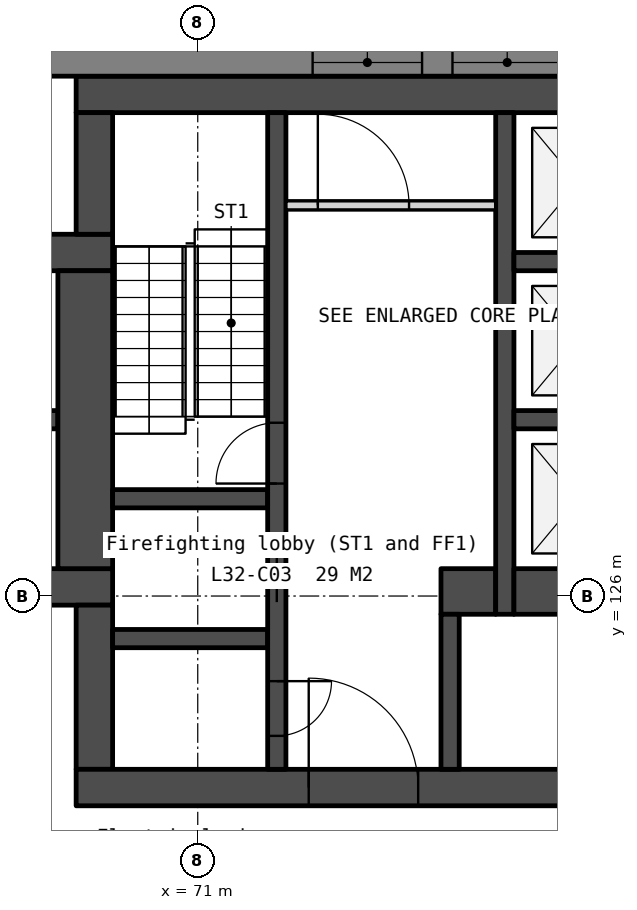
"""IFC4 building model, lengths in metres.
Left out: names, types, materials, properties, quantities, classifications, styles, units other than length and angle.
Written with IfcOpenShell. Run it as: python <this file> out.ifc"""

import sys

from ifc_helpers import new_model, si_unit, direction, frame, frame_2d, origin, place, context, subcontext, project, spatial, polyline, rectangle, outline, extrude, element, fill, save


model = new_model("IFC4")
c1 = context("Model", 3, precision=1e-05, world=origin(), true_north=direction((0.0, 1.0)))
c2 = subcontext(c1, "Body", "Model", "MODEL_VIEW")
j1 = project(units=[si_unit("LENGTHUNIT", "METRE"), si_unit("PLANEANGLEUNIT", "RADIAN")], contexts=[c1])
p1 = place(None, origin())
s1 = spatial("IfcSite", under=j1, at=p1, CompositionType="ELEMENT")
p2 = place(p1, origin())
s2 = spatial("IfcBuilding", under=s1, at=p2, CompositionType="ELEMENT")
p3 = place(p2, frame((0.0, 0.0, 128.6)))
s3 = spatial("IfcBuildingStorey", under=s2, at=p3, CompositionType="ELEMENT", Elevation=128.6)
for number, where, z_axis, x_axis in (
    (1, (66.0, 131.65, 0.0), (0.0, 0.0, 1.0), (1.0, 0.0, 0.0)),
    (2, (66.0, 126.15, 0.0), (0.0, 0.0, 1.0), (1.0, 0.0, 0.0)),
):
    element("IfcWall", number, at=place(p3, frame(where, z_axis=z_axis, x_axis=x_axis)), inside=s3, PredefinedType="SOLIDWALL", context=c2, shape_type="SweptSolid", body=[
        extrude(rectangle(XDim=3.6, YDim=0.6, at=frame_2d((1.8, 0.0))), origin(), (0.0, 0.0, 1.0), 3.75),
    ])
p4 = place(p3, frame((66.6, 128.9, 0.0), z_axis=(0.0, 0.0, 1.0), x_axis=(1.0, 0.0, 0.0)))
e3 = element("IfcWall", 3, at=p4, inside=s3, PredefinedType="SOLIDWALL", context=c2, shape_type="SweptSolid", body=[
    extrude(rectangle(XDim=2.1, YDim=0.3, at=frame_2d((1.05, 0.0))), origin(), (0.0, 0.0, 1.0), 3.75),
])
p5 = place(p3, frame((69.15, 131.35, 0.0), z_axis=(0.0, 0.0, 1.0), x_axis=(0.0, -1.0, 0.0)))
e4 = element("IfcWall", 4, at=p5, inside=s3, PredefinedType="SOLIDWALL", context=c2, shape_type="SweptSolid", body=[
    extrude(rectangle(XDim=4.9, YDim=0.9, at=frame_2d((2.45, 0.0))), origin(), (0.0, 0.0, 1.0), 3.75),
])
p6 = place(p3, frame((69.0, 134.25, 0.0), z_axis=(0.0, 0.0, 1.0), x_axis=(1.0, 0.0, 0.0)))
e5 = element("IfcWall", 5, at=p6, inside=s3, PredefinedType="SOLIDWALL", context=c2, shape_type="SweptSolid", body=[
    extrude(rectangle(XDim=22.0, YDim=0.6, at=frame_2d((11.0, 0.0))), origin(), (0.0, 0.0, 1.0), 3.75),
])
p7 = place(p3, frame((69.3, 133.95, 0.0), z_axis=(0.0, 0.0, 1.0), x_axis=(0.0, -1.0, 0.0)))
e6 = element("IfcWall", 6, at=p7, inside=s3, PredefinedType="SOLIDWALL", context=c2, shape_type="SweptSolid", body=[
    extrude(rectangle(XDim=2.0, YDim=0.6, at=frame_2d((1.0, 0.0))), origin(), (0.0, 0.0, 1.0), 3.75),
])
p8 = place(p3, frame((69.3, 125.85, 0.0), z_axis=(0.0, 0.0, 1.0), x_axis=(0.0, -1.0, 0.0)))
e7 = element("IfcWall", 7, at=p8, inside=s3, PredefinedType="SOLIDWALL", context=c2, shape_type="SweptSolid", body=[
    extrude(rectangle(XDim=2.7, YDim=0.6, at=frame_2d((1.35, 0.0))), origin(), (0.0, 0.0, 1.0), 3.75),
])
p9 = place(p3, frame((69.0, 122.85, 0.0), z_axis=(0.0, 0.0, 1.0), x_axis=(1.0, 0.0, 0.0)))
e8 = element("IfcWall", 8, at=p9, inside=s3, PredefinedType="SOLIDWALL", context=c2, shape_type="SweptSolid", body=[
    extrude(rectangle(XDim=22.0, YDim=0.6, at=frame_2d((11.0, 0.0))), origin(), (0.0, 0.0, 1.0), 3.75),
])
p10 = place(p9, frame((16.375, 0.0, 0.0)))
e9 = element("IfcOpeningElement", 9, at=p10, cuts=e8, PredefinedType="OPENING", context=c2, shape_type="SweptSolid", body=[
    extrude(rectangle(XDim=1.8, YDim=2.1, at=frame_2d((0.9, 1.05))), frame((0.0, 0.31, 0.0), z_axis=(0.0, -1.0, 0.0), x_axis=(1.0, 0.0, 0.0)), (0.0, 0.0, 1.0), 0.62),
])
p11 = place(p9, frame((3.825, 0.0, 0.0)))
e10 = element("IfcOpeningElement", 10, at=p11, cuts=e8, PredefinedType="OPENING", context=c2, shape_type="SweptSolid", body=[
    extrude(rectangle(XDim=1.8, YDim=2.1, at=frame_2d((0.9, 1.05))), frame((0.0, 0.31, 0.0), z_axis=(0.0, -1.0, 0.0), x_axis=(1.0, 0.0, 0.0)), (0.0, 0.0, 1.0), 0.62),
])
p12 = place(p9, frame((12.85, 0.0, 0.0)))
e11 = element("IfcOpeningElement", 11, at=p12, cuts=e8, PredefinedType="OPENING", context=c2, shape_type="SweptSolid", body=[
    extrude(rectangle(XDim=1.5, YDim=2.1, at=frame_2d((0.75, 1.05))), frame((0.0, 0.31, 0.0), z_axis=(0.0, -1.0, 0.0), x_axis=(1.0, 0.0, 0.0)), (0.0, 0.0, 1.0), 0.62),
])
for number, where, z_axis, x_axis in (
    (12, (69.6, 127.6, 0.0), (0.0, 0.0, 1.0), (1.0, 0.0, 0.0)),
    (13, (69.6, 125.3, 0.0), (0.0, 0.0, 1.0), (1.0, 0.0, 0.0)),
):
    element("IfcWall", number, at=place(p3, frame(where, z_axis=z_axis, x_axis=x_axis)), inside=s3, PredefinedType="SOLIDWALL", context=c2, shape_type="SweptSolid", body=[
        extrude(rectangle(XDim=2.55, YDim=0.3, at=frame_2d((1.275, 0.0))), origin(), (0.0, 0.0, 1.0), 3.75),
    ])
p13 = place(p3, frame((72.3, 133.95, 0.0), z_axis=(0.0, 0.0, 1.0), x_axis=(0.0, -1.0, 0.0)))
e14 = element("IfcWall", 14, at=p13, inside=s3, PredefinedType="SOLIDWALL", context=c2, shape_type="SweptSolid", body=[
    extrude(rectangle(XDim=10.8, YDim=0.3, at=frame_2d((5.4, 0.0))), origin(), (0.0, 0.0, 1.0), 3.75),
])
p14 = place(p13, frame((6.95, 0.0, 0.0)))
e15 = element("IfcOpeningElement", 15, at=p14, cuts=e14, PredefinedType="OPENING", context=c2, shape_type="SweptSolid", body=[
    extrude(rectangle(XDim=1.1, YDim=2.1, at=frame_2d((0.55, 1.05))), frame((0.0, 0.16, 0.0), z_axis=(0.0, -1.0, 0.0), x_axis=(1.0, 0.0, 0.0)), (0.0, 0.0, 1.0), 0.32),
])
p15 = place(p13, frame((9.35, 0.0, 0.0)))
e16 = element("IfcOpeningElement", 16, at=p15, cuts=e14, PredefinedType="OPENING", context=c2, shape_type="SweptSolid", body=[
    extrude(rectangle(XDim=0.9, YDim=2.1, at=frame_2d((0.45, 1.05))), frame((0.0, 0.16, 0.0), z_axis=(0.0, -1.0, 0.0), x_axis=(1.0, 0.0, 0.0)), (0.0, 0.0, 1.0), 0.32),
])
p16 = place(p13, frame((5.1, 0.0, 0.0)))
e17 = element("IfcOpeningElement", 17, at=p16, cuts=e14, PredefinedType="OPENING", context=c2, shape_type="SweptSolid", body=[
    extrude(rectangle(XDim=1.0, YDim=2.1, at=frame_2d((0.5, 1.05))), frame((0.0, 0.16, 0.0), z_axis=(0.0, -1.0, 0.0), x_axis=(1.0, 0.0, 0.0)), (0.0, 0.0, 1.0), 0.32),
])
p17 = place(p3, frame((72.45, 132.425, 0.0), z_axis=(0.0, 0.0, 1.0), x_axis=(1.0, 0.0, 0.0)))
e18 = element("IfcWall", 18, at=p17, inside=s3, PredefinedType="PARTITIONING", context=c2, shape_type="SweptSolid", body=[
    extrude(rectangle(XDim=3.45, YDim=0.15, at=frame_2d((1.725, 0.0))), origin(), (0.0, 0.0, 1.0), 3.75),
])
p18 = place(p17, frame((0.525, 0.0, 0.0)))
e19 = element("IfcOpeningElement", 19, at=p18, cuts=e18, PredefinedType="OPENING", context=c2, shape_type="SweptSolid", body=[
    extrude(rectangle(XDim=1.5, YDim=2.1, at=frame_2d((0.75, 1.05))), frame((0.0, 0.085, 0.0), z_axis=(0.0, -1.0, 0.0), x_axis=(1.0, 0.0, 0.0)), (0.0, 0.0, 1.0), 0.17),
])
p19 = place(p3, frame((75.0, 126.075, 0.0), z_axis=(0.0, 0.0, 1.0), x_axis=(1.0, 0.0, 0.0)))
e20 = element("IfcWall", 20, at=p19, inside=s3, PredefinedType="SOLIDWALL", context=c2, shape_type="SweptSolid", body=[
    extrude(rectangle(XDim=0.9, YDim=0.75, at=frame_2d((0.45, 0.0))), origin(), (0.0, 0.0, 1.0), 3.75),
])
p20 = place(p3, frame((75.15, 125.7, 0.0), z_axis=(0.0, 0.0, 1.0), x_axis=(0.0, -1.0, 0.0)))
e21 = element("IfcWall", 21, at=p20, inside=s3, PredefinedType="SOLIDWALL", context=c2, shape_type="SweptSolid", body=[
    extrude(rectangle(XDim=2.55, YDim=0.3, at=frame_2d((1.275, 0.0))), origin(), (0.0, 0.0, 1.0), 3.75),
])
p21 = place(p3, frame((76.05, 133.95, 0.0), z_axis=(0.0, 0.0, 1.0), x_axis=(0.0, -1.0, 0.0)))
e22 = element("IfcWall", 22, at=p21, inside=s3, PredefinedType="SOLIDWALL", context=c2, shape_type="SweptSolid", body=[
    extrude(rectangle(XDim=8.25, YDim=0.3, at=frame_2d((4.125, 0.0))), origin(), (0.0, 0.0, 1.0), 3.75),
])
for number, where, z_axis, x_axis in (
    (23, (76.2, 131.5, 0.0), (0.0, 0.0, 1.0), (1.0, 0.0, 0.0)),
    (24, (76.2, 128.9, 0.0), (0.0, 0.0, 1.0), (1.0, 0.0, 0.0)),
):
    element("IfcWall", number, at=place(p3, frame(where, z_axis=z_axis, x_axis=x_axis)), inside=s3, PredefinedType="SOLIDWALL", context=c2, shape_type="SweptSolid", body=[
        extrude(rectangle(XDim=2.1, YDim=0.3, at=frame_2d((1.05, 0.0))), origin(), (0.0, 0.0, 1.0), 3.75),
    ])
p22 = place(p3, frame((76.2, 126.075, 0.0), z_axis=(0.0, 0.0, 1.0), x_axis=(1.0, 0.0, 0.0)))
e25 = element("IfcWall", 25, at=p22, inside=s3, PredefinedType="SOLIDWALL", context=c2, shape_type="SweptSolid", body=[
    extrude(rectangle(XDim=2.1, YDim=0.75, at=frame_2d((1.05, 0.0))), origin(), (0.0, 0.0, 1.0), 3.75),
])
p23 = place(p3, frame((100.243, 134.775, -0.45), z_axis=(0.0, 0.0, 1.0), x_axis=(-1.0, 0.0, 0.0)))
e26 = element("IfcWall", 26, at=p23, inside=s3, PredefinedType="SOLIDWALL", context=c2, shape_type="SweptSolid", body=[
    extrude(outline(polyline([(40.486, 0.0), (40.486, 4.2), (0.0, 4.2), (0.0, 0.0), (40.486, 0.0)])), frame((0.0, 0.225, 0.0), z_axis=(0.0, -1.0, 0.0), x_axis=(1.0, 0.0, 0.0)), (0.0, 0.0, 1.0), 0.45),
])
p24 = place(p23, frame((3.011, 0.0, 1.25)))
e27 = element("IfcOpeningElement", 27, at=p24, cuts=e26, PredefinedType="OPENING", context=c2, shape_type="SweptSolid", body=[
    extrude(rectangle(XDim=1.8, YDim=2.2, at=frame_2d((0.9, 1.1))), frame((0.0, 0.235, 0.0), z_axis=(0.0, -1.0, 0.0), x_axis=(1.0, 0.0, 0.0)), (0.0, 0.0, 1.0), 0.47),
])
p25 = place(p23, frame((5.311, 0.0, 1.25)))
e28 = element("IfcOpeningElement", 28, at=p25, cuts=e26, PredefinedType="OPENING", context=c2, shape_type="SweptSolid", body=[
    extrude(rectangle(XDim=1.8, YDim=2.2, at=frame_2d((0.9, 1.1))), frame((0.0, 0.235, 0.0), z_axis=(0.0, -1.0, 0.0), x_axis=(1.0, 0.0, 0.0)), (0.0, 0.0, 1.0), 0.47),
])
p26 = place(p23, frame((13.132, 0.0, 1.25)))
e29 = element("IfcOpeningElement", 29, at=p26, cuts=e26, PredefinedType="OPENING", context=c2, shape_type="SweptSolid", body=[
    extrude(rectangle(XDim=1.8, YDim=2.2, at=frame_2d((0.9, 1.1))), frame((0.0, 0.235, 0.0), z_axis=(0.0, -1.0, 0.0), x_axis=(1.0, 0.0, 0.0)), (0.0, 0.0, 1.0), 0.47),
])
p27 = place(p23, frame((15.432, 0.0, 1.25)))
e30 = element("IfcOpeningElement", 30, at=p27, cuts=e26, PredefinedType="OPENING", context=c2, shape_type="SweptSolid", body=[
    extrude(rectangle(XDim=1.8, YDim=2.2, at=frame_2d((0.9, 1.1))), frame((0.0, 0.235, 0.0), z_axis=(0.0, -1.0, 0.0), x_axis=(1.0, 0.0, 0.0)), (0.0, 0.0, 1.0), 0.47),
])
p28 = place(p23, frame((23.254, 0.0, 1.25)))
e31 = element("IfcOpeningElement", 31, at=p28, cuts=e26, PredefinedType="OPENING", context=c2, shape_type="SweptSolid", body=[
    extrude(rectangle(XDim=1.8, YDim=2.2, at=frame_2d((0.9, 1.1))), frame((0.0, 0.235, 0.0), z_axis=(0.0, -1.0, 0.0), x_axis=(1.0, 0.0, 0.0)), (0.0, 0.0, 1.0), 0.47),
])
p29 = place(p23, frame((25.554, 0.0, 1.25)))
e32 = element("IfcOpeningElement", 32, at=p29, cuts=e26, PredefinedType="OPENING", context=c2, shape_type="SweptSolid", body=[
    extrude(rectangle(XDim=1.8, YDim=2.2, at=frame_2d((0.9, 1.1))), frame((0.0, 0.235, 0.0), z_axis=(0.0, -1.0, 0.0), x_axis=(1.0, 0.0, 0.0)), (0.0, 0.0, 1.0), 0.47),
])
p30 = place(p23, frame((33.375, 0.0, 1.25)))
e33 = element("IfcOpeningElement", 33, at=p30, cuts=e26, PredefinedType="OPENING", context=c2, shape_type="SweptSolid", body=[
    extrude(rectangle(XDim=1.8, YDim=2.2, at=frame_2d((0.9, 1.1))), frame((0.0, 0.235, 0.0), z_axis=(0.0, -1.0, 0.0), x_axis=(1.0, 0.0, 0.0)), (0.0, 0.0, 1.0), 0.47),
])
p31 = place(p23, frame((35.675, 0.0, 1.25)))
e34 = element("IfcOpeningElement", 34, at=p31, cuts=e26, PredefinedType="OPENING", context=c2, shape_type="SweptSolid", body=[
    extrude(rectangle(XDim=1.8, YDim=2.2, at=frame_2d((0.9, 1.1))), frame((0.0, 0.235, 0.0), z_axis=(0.0, -1.0, 0.0), x_axis=(1.0, 0.0, 0.0)), (0.0, 0.0, 1.0), 0.47),
])
p32 = place(p3, frame((57.652, 131.129, -0.45), z_axis=(0.0, 0.0, 1.0), x_axis=(0.499997369791, -0.866026922331, 0.0)))
e35 = element("IfcWall", 35, at=p32, inside=s3, PredefinedType="SOLIDWALL", context=c2, shape_type="SweptSolid", body=[
    extrude(outline(polyline([(40.486, 0.0), (40.486, 4.2), (0.0, 4.2), (0.0, 0.0), (40.486, 0.0)])), frame((0.0, 0.225, 0.0), z_axis=(0.0, -1.0, 0.0), x_axis=(1.0, 0.0, 0.0)), (0.0, 0.0, 1.0), 0.45),
])
p33 = place(p32, frame((3.011, 0.0, 1.25)))
e36 = element("IfcOpeningElement", 36, at=p33, cuts=e35, PredefinedType="OPENING", context=c2, shape_type="SweptSolid", body=[
    extrude(rectangle(XDim=1.8, YDim=2.2, at=frame_2d((0.9, 1.1))), frame((0.0, 0.235, 0.0), z_axis=(0.0, -1.0, 0.0), x_axis=(1.0, 0.0, 0.0)), (0.0, 0.0, 1.0), 0.47),
])
p34 = place(p32, frame((5.311, 0.0, 1.25)))
e37 = element("IfcOpeningElement", 37, at=p34, cuts=e35, PredefinedType="OPENING", context=c2, shape_type="SweptSolid", body=[
    extrude(rectangle(XDim=1.8, YDim=2.2, at=frame_2d((0.9, 1.1))), frame((0.0, 0.235, 0.0), z_axis=(0.0, -1.0, 0.0), x_axis=(1.0, 0.0, 0.0)), (0.0, 0.0, 1.0), 0.47),
])
p35 = place(p32, frame((13.132, 0.0, 1.25)))
e38 = element("IfcOpeningElement", 38, at=p35, cuts=e35, PredefinedType="OPENING", context=c2, shape_type="SweptSolid", body=[
    extrude(rectangle(XDim=1.8, YDim=2.2, at=frame_2d((0.9, 1.1))), frame((0.0, 0.235, 0.0), z_axis=(0.0, -1.0, 0.0), x_axis=(1.0, 0.0, 0.0)), (0.0, 0.0, 1.0), 0.47),
])
p36 = place(p32, frame((15.432, 0.0, 1.25)))
e39 = element("IfcOpeningElement", 39, at=p36, cuts=e35, PredefinedType="OPENING", context=c2, shape_type="SweptSolid", body=[
    extrude(rectangle(XDim=1.8, YDim=2.2, at=frame_2d((0.9, 1.1))), frame((0.0, 0.235, 0.0), z_axis=(0.0, -1.0, 0.0), x_axis=(1.0, 0.0, 0.0)), (0.0, 0.0, 1.0), 0.47),
])
p37 = place(p32, frame((23.254, 0.0, 1.25)))
e40 = element("IfcOpeningElement", 40, at=p37, cuts=e35, PredefinedType="OPENING", context=c2, shape_type="SweptSolid", body=[
    extrude(rectangle(XDim=1.8, YDim=2.2, at=frame_2d((0.9, 1.1))), frame((0.0, 0.235, 0.0), z_axis=(0.0, -1.0, 0.0), x_axis=(1.0, 0.0, 0.0)), (0.0, 0.0, 1.0), 0.47),
])
p38 = place(p32, frame((25.554, 0.0, 1.25)))
e41 = element("IfcOpeningElement", 41, at=p38, cuts=e35, PredefinedType="OPENING", context=c2, shape_type="SweptSolid", body=[
    extrude(rectangle(XDim=1.8, YDim=2.2, at=frame_2d((0.9, 1.1))), frame((0.0, 0.235, 0.0), z_axis=(0.0, -1.0, 0.0), x_axis=(1.0, 0.0, 0.0)), (0.0, 0.0, 1.0), 0.47),
])
p39 = place(p32, frame((33.375, 0.0, 1.25)))
e42 = element("IfcOpeningElement", 42, at=p39, cuts=e35, PredefinedType="OPENING", context=c2, shape_type="SweptSolid", body=[
    extrude(rectangle(XDim=1.8, YDim=2.2, at=frame_2d((0.9, 1.1))), frame((0.0, 0.235, 0.0), z_axis=(0.0, -1.0, 0.0), x_axis=(1.0, 0.0, 0.0)), (0.0, 0.0, 1.0), 0.47),
])
p40 = place(p32, frame((35.675, 0.0, 1.25)))
e43 = element("IfcOpeningElement", 43, at=p40, cuts=e35, PredefinedType="OPENING", context=c2, shape_type="SweptSolid", body=[
    extrude(rectangle(XDim=1.8, YDim=2.2, at=frame_2d((0.9, 1.1))), frame((0.0, 0.235, 0.0), z_axis=(0.0, -1.0, 0.0), x_axis=(1.0, 0.0, 0.0)), (0.0, 0.0, 1.0), 0.47),
])
p41 = place(p14, origin())
e44 = element("IfcDoor", 44, at=p41, inside=s3, OperationType="SLIDING_TO_LEFT", PredefinedType="DOOR", context=c2, shape_type="SweptSolid", body=[
    extrude(rectangle(XDim=1.1, YDim=2.1, at=frame_2d((0.55, 1.05))), frame((0.0, 0.025, 0.0), z_axis=(0.0, -1.0, 0.0), x_axis=(1.0, 0.0, 0.0)), (0.0, 0.0, 1.0), 0.05),
])
fill(e15, e44)
p42 = place(p11, origin())
e45 = element("IfcDoor", 45, at=p42, inside=s3, OperationType="DOUBLE_DOOR_DOUBLE_SWING", PredefinedType="DOOR", context=c2, shape_type="SweptSolid", body=[
    extrude(rectangle(XDim=1.8, YDim=2.1, at=frame_2d((0.9, 1.05))), frame((0.0, 0.025, 0.0), z_axis=(0.0, -1.0, 0.0), x_axis=(1.0, 0.0, 0.0)), (0.0, 0.0, 1.0), 0.05),
])
fill(e10, e45)
p43 = place(p18, origin())
e46 = element("IfcDoor", 46, at=p43, inside=s3, OperationType="DOUBLE_DOOR_DOUBLE_SWING", PredefinedType="DOOR", context=c2, shape_type="SweptSolid", body=[
    extrude(rectangle(XDim=1.5, YDim=2.1, at=frame_2d((0.75, 1.05))), frame((0.0, 0.025, 0.0), z_axis=(0.0, -1.0, 0.0), x_axis=(1.0, 0.0, 0.0)), (0.0, 0.0, 1.0), 0.05),
])
fill(e19, e46)
p44 = place(p15, origin())
e47 = element("IfcDoor", 47, at=p44, inside=s3, OperationType="SINGLE_SWING_LEFT", PredefinedType="DOOR", context=c2, shape_type="SweptSolid", body=[
    extrude(rectangle(XDim=0.9, YDim=2.1, at=frame_2d((0.45, 1.05))), frame((0.0, 0.025, 0.0), z_axis=(0.0, -1.0, 0.0), x_axis=(1.0, 0.0, 0.0)), (0.0, 0.0, 1.0), 0.05),
])
fill(e16, e47)
p45 = place(p16, origin())
e48 = element("IfcDoor", 48, at=p45, inside=s3, OperationType="SINGLE_SWING_RIGHT", PredefinedType="DOOR", context=c2, shape_type="SweptSolid", body=[
    extrude(rectangle(XDim=1.0, YDim=2.1, at=frame_2d((0.5, 1.05))), frame((0.0, 0.025, 0.0), z_axis=(0.0, -1.0, 0.0), x_axis=(1.0, 0.0, 0.0)), (0.0, 0.0, 1.0), 0.05),
])
fill(e17, e48)
p46 = place(p28, origin())
e49 = element("IfcWindow", 49, at=p46, inside=s3, PartitioningType="SINGLE_PANEL", PredefinedType="WINDOW", context=c2, shape_type="SweptSolid", body=[
    extrude(rectangle(XDim=1.8, YDim=2.2, at=frame_2d((0.9, 1.1))), frame((0.0, 0.03, 0.0), z_axis=(0.0, -1.0, 0.0), x_axis=(1.0, 0.0, 0.0)), (0.0, 0.0, 1.0), 0.06),
])
fill(e31, e49)
p47 = place(p29, origin())
e50 = element("IfcWindow", 50, at=p47, inside=s3, PartitioningType="SINGLE_PANEL", PredefinedType="WINDOW", context=c2, shape_type="SweptSolid", body=[
    extrude(rectangle(XDim=1.8, YDim=2.2, at=frame_2d((0.9, 1.1))), frame((0.0, 0.03, 0.0), z_axis=(0.0, -1.0, 0.0), x_axis=(1.0, 0.0, 0.0)), (0.0, 0.0, 1.0), 0.06),
])
fill(e32, e50)
save(model, sys.argv[1])
